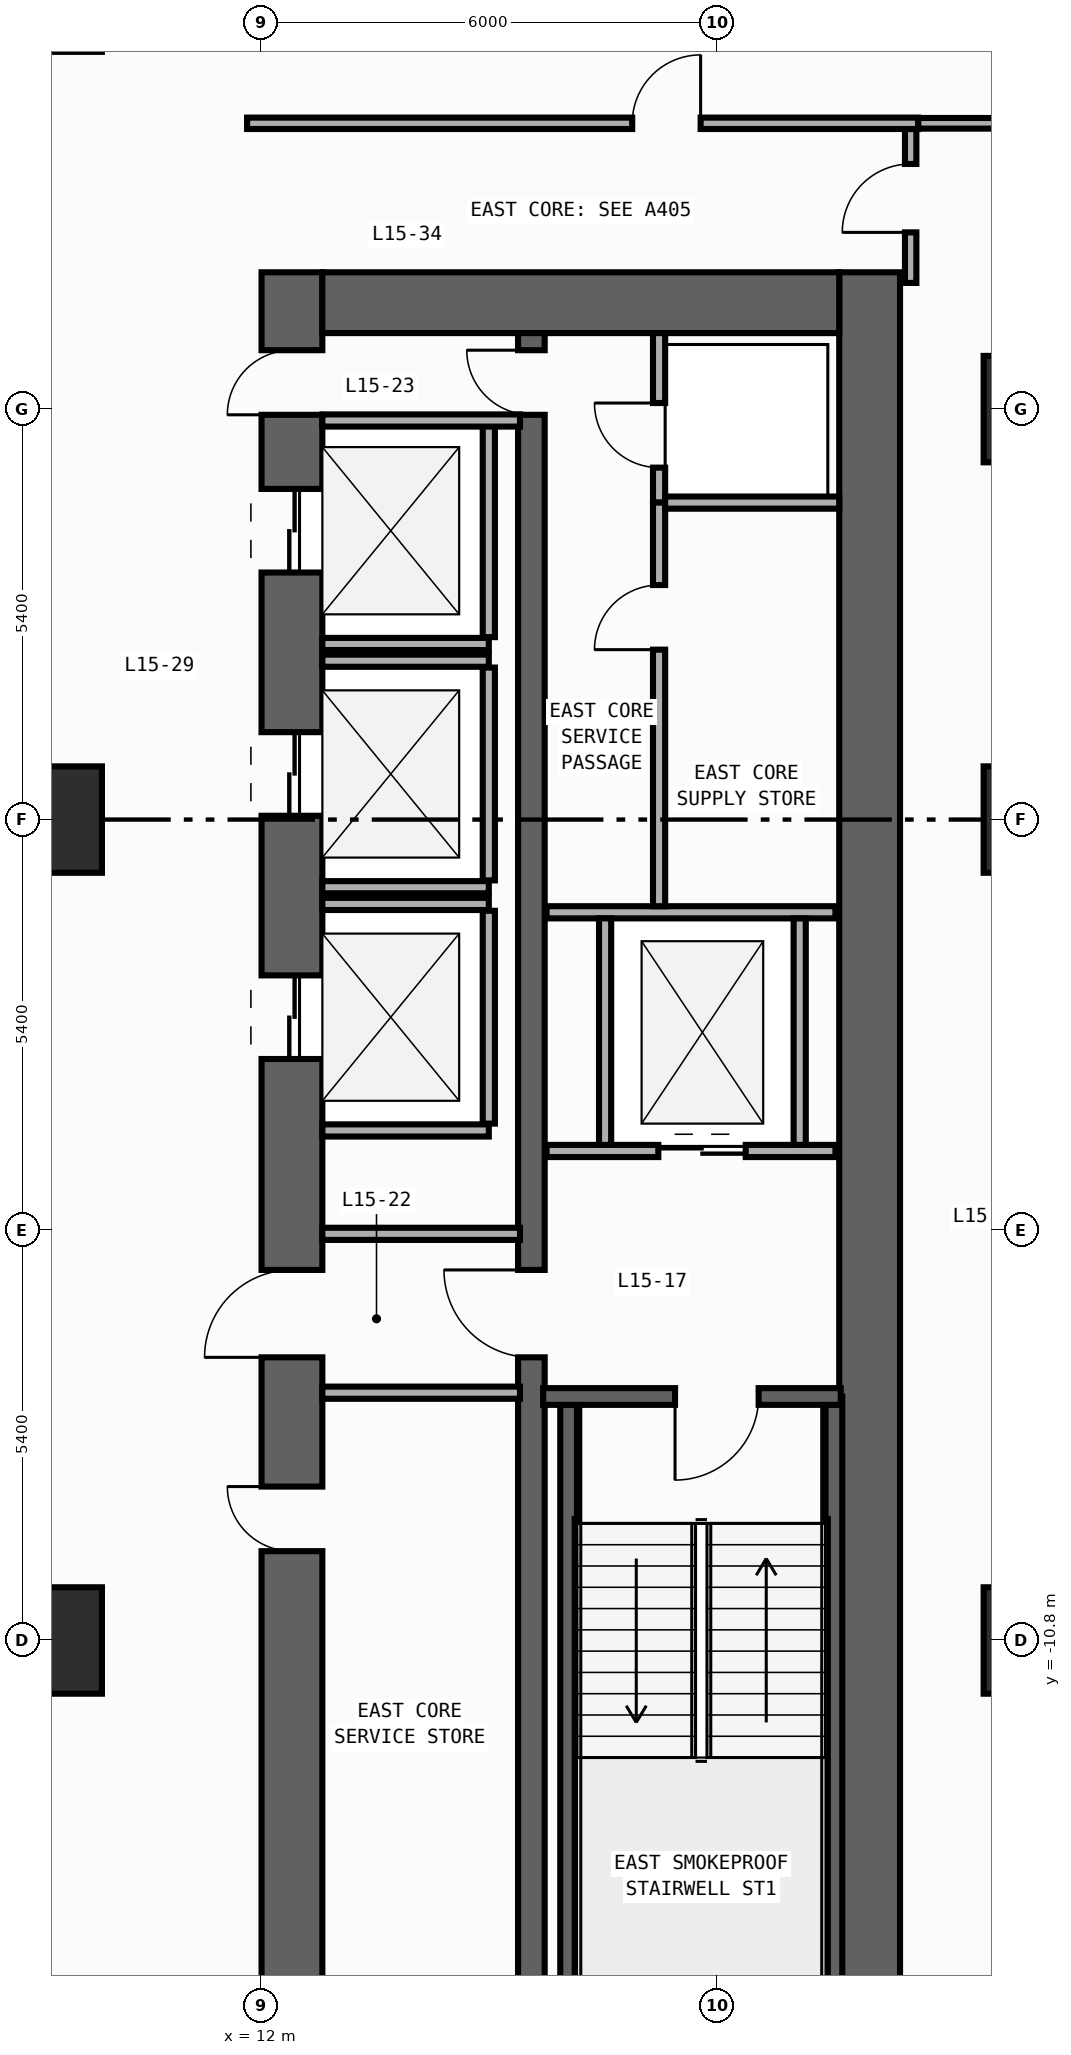
"""IFC4 building model, lengths in metres.
Left out: names, types, materials, properties, quantities, classifications, styles, units other than length and angle.
Written with IfcOpenShell. Run it as: python <this file> out.ifc"""

import sys

from ifc_helpers import new_model, si_unit, direction, frame, frame_2d, origin, origin_2d, place, context, subcontext, project, spatial, rectangle, extrude, element, fill, save


model = new_model("IFC4")
c1 = context("Model", 3, precision=1e-05, world=origin(), true_north=direction((0.0, 1.0)))
c2 = subcontext(c1, "Body", "Model", "MODEL_VIEW")
j1 = project(units=[si_unit("LENGTHUNIT", "METRE"), si_unit("PLANEANGLEUNIT", "RADIAN")], contexts=[c1])
p1 = place(None, origin())
s1 = spatial("IfcSite", under=j1, at=p1, CompositionType="ELEMENT")
p2 = place(p1, origin())
s2 = spatial("IfcBuilding", under=s1, at=p2, CompositionType="ELEMENT")
p3 = place(p2, frame((0.0, 0.0, 63.8)))
s3 = spatial("IfcBuildingStorey", under=s2, at=p3, CompositionType="ELEMENT", Elevation=63.8)
p4 = place(p3, frame((12.4, -19.8, 0.0), z_axis=(0.0, 0.0, 1.0), x_axis=(0.0, 1.0, 0.0)))
e1 = element("IfcWall", 1, at=p4, inside=s3, PredefinedType="SHEAR", context=c2, shape_type="SweptSolid", body=[
    extrude(rectangle(XDim=27.0, YDim=0.8, at=frame_2d((13.5, 0.0))), origin(), (0.0, 0.0, 1.0), 3.94),
])
p5 = place(p4, frame((23.05, 0.0, 0.0)))
e2 = element("IfcOpeningElement", 2, at=p5, cuts=e1, PredefinedType="OPENING", context=c2, shape_type="SweptSolid", body=[
    extrude(rectangle(XDim=1.1, YDim=2.2, at=frame_2d((0.55, 1.1))), frame((0.0, 0.41, 0.0), z_axis=(0.0, -1.0, 0.0), x_axis=(1.0, 0.0, 0.0)), (0.0, 0.0, 1.0), 0.82),
])
p6 = place(p4, frame((19.85, 0.0, 0.0)))
e3 = element("IfcOpeningElement", 3, at=p6, cuts=e1, PredefinedType="OPENING", context=c2, shape_type="SweptSolid", body=[
    extrude(rectangle(XDim=1.1, YDim=2.2, at=frame_2d((0.55, 1.1))), frame((0.0, 0.41, 0.0), z_axis=(0.0, -1.0, 0.0), x_axis=(1.0, 0.0, 0.0)), (0.0, 0.0, 1.0), 0.82),
])
p7 = place(p4, frame((16.65, 0.0, 0.0)))
e4 = element("IfcOpeningElement", 4, at=p7, cuts=e1, PredefinedType="OPENING", context=c2, shape_type="SweptSolid", body=[
    extrude(rectangle(XDim=1.1, YDim=2.2, at=frame_2d((0.55, 1.1))), frame((0.0, 0.41, 0.0), z_axis=(0.0, -1.0, 0.0), x_axis=(1.0, 0.0, 0.0)), (0.0, 0.0, 1.0), 0.82),
])
p8 = place(p4, frame((10.175, 0.0, 0.0)))
e5 = element("IfcOpeningElement", 5, at=p8, cuts=e1, PredefinedType="OPENING", context=c2, shape_type="SweptSolid", body=[
    extrude(rectangle(XDim=0.85, YDim=2.1, at=frame_2d((0.425, 1.05))), frame((0.0, 0.41, 0.0), z_axis=(0.0, -1.0, 0.0), x_axis=(1.0, 0.0, 0.0)), (0.0, 0.0, 1.0), 0.82),
])
p9 = place(p4, frame((12.725, 0.0, 0.0)))
e6 = element("IfcOpeningElement", 6, at=p9, cuts=e1, PredefinedType="OPENING", context=c2, shape_type="SweptSolid", body=[
    extrude(rectangle(XDim=1.15, YDim=2.2, at=frame_2d((0.575, 1.1))), frame((0.0, 0.41, 0.0), z_axis=(0.0, -1.0, 0.0), x_axis=(1.0, 0.0, 0.0)), (0.0, 0.0, 1.0), 0.82),
])
p10 = place(p4, frame((25.125, 0.0, 0.0)))
e7 = element("IfcOpeningElement", 7, at=p10, cuts=e1, PredefinedType="OPENING", context=c2, shape_type="SweptSolid", body=[
    extrude(rectangle(XDim=0.85, YDim=2.1, at=frame_2d((0.425, 1.05))), frame((0.0, 0.41, 0.0), z_axis=(0.0, -1.0, 0.0), x_axis=(1.0, 0.0, 0.0)), (0.0, 0.0, 1.0), 0.82),
])
p11 = place(p3, frame((20.0, -19.8, 0.0), z_axis=(0.0, 0.0, 1.0), x_axis=(0.0, 1.0, 0.0)))
e8 = element("IfcWall", 8, at=p11, inside=s3, PredefinedType="SHEAR", context=c2, shape_type="SweptSolid", body=[
    extrude(rectangle(XDim=27.0, YDim=0.8, at=frame_2d((13.5, 0.0))), origin(), (0.0, 0.0, 1.0), 3.94),
])
p12 = place(p3, frame((12.8, 6.8, 0.0), z_axis=(0.0, 0.0, 1.0), x_axis=(1.0, 0.0, 0.0)))
e9 = element("IfcWall", 9, at=p12, inside=s3, PredefinedType="SHEAR", context=c2, shape_type="SweptSolid", body=[
    extrude(rectangle(XDim=6.8, YDim=0.8, at=frame_2d((3.4, 0.0))), origin(), (0.0, 0.0, 1.0), 3.94),
])
p13 = place(p3, frame((15.55, -19.0, 0.0), z_axis=(0.0, 0.0, 1.0), x_axis=(0.0, 1.0, 0.0)))
e10 = element("IfcWall", 10, at=p13, inside=s3, PredefinedType="SHEAR", context=c2, shape_type="SweptSolid", body=[
    extrude(rectangle(XDim=25.4, YDim=0.35, at=frame_2d((12.7, 0.0))), origin(), (0.0, 0.0, 1.0), 3.94),
])
p14 = place(p13, frame((11.925, 0.0, 0.0)))
e11 = element("IfcOpeningElement", 11, at=p14, cuts=e10, PredefinedType="OPENING", context=c2, shape_type="SweptSolid", body=[
    extrude(rectangle(XDim=1.15, YDim=2.2, at=frame_2d((0.575, 1.1))), frame((0.0, 0.185, 0.0), z_axis=(0.0, -1.0, 0.0), x_axis=(1.0, 0.0, 0.0)), (0.0, 0.0, 1.0), 0.37),
])
p15 = place(p13, frame((24.325, 0.0, 0.0)))
e12 = element("IfcOpeningElement", 12, at=p15, cuts=e10, PredefinedType="OPENING", context=c2, shape_type="SweptSolid", body=[
    extrude(rectangle(XDim=0.85, YDim=2.1, at=frame_2d((0.425, 1.05))), frame((0.0, 0.185, 0.0), z_axis=(0.0, -1.0, 0.0), x_axis=(1.0, 0.0, 0.0)), (0.0, 0.0, 1.0), 0.37),
])
for number, where, z_axis, x_axis in (
    (13, (16.04, -18.89, 0.0), (0.0, 0.0, 1.0), (0.0, 1.0, 0.0)),
    (14, (19.53, -18.89, 0.0), (0.0, 0.0, 1.0), (0.0, 1.0, 0.0)),
):
    element("IfcWall", number, at=place(p3, frame(where, z_axis=z_axis, x_axis=x_axis)), inside=s3, PredefinedType="SHEAR", context=c2, shape_type="SweptSolid", body=[
        extrude(rectangle(XDim=11.3, YDim=0.22, at=frame_2d((5.65, 0.0))), origin(), (0.0, 0.0, 1.0), 3.94),
    ])
p16 = place(p3, frame((19.62, -7.59, 0.0), z_axis=(0.0, 0.0, 1.0), x_axis=(-1.0, 0.0, 0.0)))
e15 = element("IfcWall", 15, at=p16, inside=s3, PredefinedType="SHEAR", context=c2, shape_type="SweptSolid", body=[
    extrude(rectangle(XDim=3.915, YDim=0.22, at=frame_2d((1.958, 0.0))), origin(), (0.0, 0.0, 1.0), 3.94),
])
p17 = place(p16, frame((1.08, 0.0, 0.0)))
e16 = element("IfcOpeningElement", 16, at=p17, cuts=e15, PredefinedType="OPENING", context=c2, shape_type="SweptSolid", body=[
    extrude(rectangle(XDim=1.1, YDim=2.2, at=frame_2d((0.55, 1.1))), frame((0.0, 0.12, 0.0), z_axis=(0.0, -1.0, 0.0), x_axis=(1.0, 0.0, 0.0)), (0.0, 0.0, 1.0), 0.24),
])
for number, where, z_axis, x_axis in (
    (17, (9.2, -10.8, 0.0), (0.0, 0.0, 1.0), (1.0, 0.0, 0.0)),
    (18, (9.2, 0.0, 0.0), (0.0, 0.0, 1.0), (1.0, 0.0, 0.0)),
    (19, (22.2, -10.8, 0.0), (0.0, 0.0, 1.0), (1.0, 0.0, 0.0)),
    (20, (22.2, 0.0, 0.0), (0.0, 0.0, 1.0), (1.0, 0.0, 0.0)),
    (21, (22.2, 5.4, 0.0), (0.0, 0.0, 1.0), (1.0, 0.0, 0.0)),
):
    element("IfcColumn", number, at=place(p3, frame(where, z_axis=z_axis, x_axis=x_axis)), inside=s3, PredefinedType="COLUMN", context=c2, shape_type="SweptSolid", body=[
        extrude(rectangle(XDim=1.4, YDim=1.4, at=origin_2d()), origin(), (0.0, 0.0, 1.0), 4.2),
    ])
p18 = place(p3, frame((12.8, 2.31, 0.0), z_axis=(0.0, 0.0, 1.0), x_axis=(1.0, 0.0, 0.0)))
e22 = element("IfcWall", 22, at=p18, inside=s3, PredefinedType="STANDARD", context=c2, shape_type="SweptSolid", body=[
    extrude(rectangle(XDim=2.19, YDim=0.16, at=frame_2d((1.095, 0.0))), origin(), (0.0, 0.0, 1.0), 3.94),
])
p19 = place(p3, frame((14.99, 2.4, 0.0), z_axis=(0.0, 0.0, 1.0), x_axis=(0.0, 1.0, 0.0)))
e23 = element("IfcWall", 23, at=p19, inside=s3, PredefinedType="STANDARD", context=c2, shape_type="SweptSolid", body=[
    extrude(rectangle(XDim=2.8, YDim=0.16, at=frame_2d((1.4, 0.0))), origin(), (0.0, 0.0, 1.0), 3.94),
])
for number, where, z_axis, x_axis in (
    (24, (12.8, -0.89, 0.0), (0.0, 0.0, 1.0), (1.0, 0.0, 0.0)),
    (25, (12.8, 2.09, 0.0), (0.0, 0.0, 1.0), (1.0, 0.0, 0.0)),
):
    element("IfcWall", number, at=place(p3, frame(where, z_axis=z_axis, x_axis=x_axis)), inside=s3, PredefinedType="STANDARD", context=c2, shape_type="SweptSolid", body=[
        extrude(rectangle(XDim=2.19, YDim=0.16, at=frame_2d((1.095, 0.0))), origin(), (0.0, 0.0, 1.0), 3.94),
    ])
p20 = place(p3, frame((14.99, -0.8, 0.0), z_axis=(0.0, 0.0, 1.0), x_axis=(0.0, 1.0, 0.0)))
e26 = element("IfcWall", 26, at=p20, inside=s3, PredefinedType="STANDARD", context=c2, shape_type="SweptSolid", body=[
    extrude(rectangle(XDim=2.8, YDim=0.16, at=frame_2d((1.4, 0.0))), origin(), (0.0, 0.0, 1.0), 3.94),
])
for number, where, z_axis, x_axis in (
    (27, (12.8, -4.09, 0.0), (0.0, 0.0, 1.0), (1.0, 0.0, 0.0)),
    (28, (12.8, -1.11, 0.0), (0.0, 0.0, 1.0), (1.0, 0.0, 0.0)),
):
    element("IfcWall", number, at=place(p3, frame(where, z_axis=z_axis, x_axis=x_axis)), inside=s3, PredefinedType="STANDARD", context=c2, shape_type="SweptSolid", body=[
        extrude(rectangle(XDim=2.19, YDim=0.16, at=frame_2d((1.095, 0.0))), origin(), (0.0, 0.0, 1.0), 3.94),
    ])
p21 = place(p3, frame((14.99, -4.0, 0.0), z_axis=(0.0, 0.0, 1.0), x_axis=(0.0, 1.0, 0.0)))
e29 = element("IfcWall", 29, at=p21, inside=s3, PredefinedType="STANDARD", context=c2, shape_type="SweptSolid", body=[
    extrude(rectangle(XDim=2.8, YDim=0.16, at=frame_2d((1.4, 0.0))), origin(), (0.0, 0.0, 1.0), 3.94),
])
p22 = place(p3, frame((15.75, -4.36, 0.0), z_axis=(0.0, 0.0, 1.0), x_axis=(1.0, 0.0, 0.0)))
e30 = element("IfcWall", 30, at=p22, inside=s3, PredefinedType="STANDARD", context=c2, shape_type="SweptSolid", body=[
    extrude(rectangle(XDim=3.8, YDim=0.16, at=frame_2d((1.9, 0.0))), origin(), (0.0, 0.0, 1.0), 3.94),
])
p23 = place(p22, frame((1.47, 0.0, 0.0)))
e31 = element("IfcOpeningElement", 31, at=p23, cuts=e30, PredefinedType="OPENING", context=c2, shape_type="SweptSolid", body=[
    extrude(rectangle(XDim=1.15, YDim=2.2, at=frame_2d((0.575, 1.1))), frame((0.0, 0.09, 0.0), z_axis=(0.0, -1.0, 0.0), x_axis=(1.0, 0.0, 0.0)), (0.0, 0.0, 1.0), 0.18),
])
p24 = place(p3, frame((15.75, -1.22, 0.0), z_axis=(0.0, 0.0, 1.0), x_axis=(1.0, 0.0, 0.0)))
e32 = element("IfcWall", 32, at=p24, inside=s3, PredefinedType="STANDARD", context=c2, shape_type="SweptSolid", body=[
    extrude(rectangle(XDim=3.8, YDim=0.16, at=frame_2d((1.9, 0.0))), origin(), (0.0, 0.0, 1.0), 3.94),
])
for number, where, z_axis, x_axis in (
    (33, (16.52, -4.28, 0.0), (0.0, 0.0, 1.0), (0.0, 1.0, 0.0)),
    (34, (19.08, -4.28, 0.0), (0.0, 0.0, 1.0), (0.0, 1.0, 0.0)),
):
    element("IfcWall", number, at=place(p3, frame(where, z_axis=z_axis, x_axis=x_axis)), inside=s3, PredefinedType="STANDARD", context=c2, shape_type="SweptSolid", body=[
        extrude(rectangle(XDim=2.98, YDim=0.16, at=frame_2d((1.49, 0.0))), origin(), (0.0, 0.0, 1.0), 3.94),
    ])
for number, where, z_axis, x_axis in (
    (35, (12.8, -5.45, 0.0), (0.0, 0.0, 1.0), (1.0, 0.0, 0.0)),
    (36, (12.8, -7.54, 0.0), (0.0, 0.0, 1.0), (1.0, 0.0, 0.0)),
    (37, (12.8, 5.25, 0.0), (0.0, 0.0, 1.0), (1.0, 0.0, 0.0)),
):
    element("IfcWall", number, at=place(p3, frame(where, z_axis=z_axis, x_axis=x_axis)), inside=s3, PredefinedType="STANDARD", context=c2, shape_type="SweptSolid", body=[
        extrude(rectangle(XDim=2.6, YDim=0.16, at=frame_2d((1.3, 0.0))), origin(), (0.0, 0.0, 1.0), 3.94),
    ])
p25 = place(p3, frame((17.23, 4.17, 0.0), z_axis=(0.0, 0.0, 1.0), x_axis=(0.0, 1.0, 0.0)))
e38 = element("IfcWall", 38, at=p25, inside=s3, PredefinedType="PARTITIONING", context=c2, shape_type="SweptSolid", body=[
    extrude(rectangle(XDim=2.23, YDim=0.16, at=frame_2d((1.115, 0.0))), origin(), (0.0, 0.0, 1.0), 3.94),
])
p26 = place(p25, frame((0.46, 0.0, 0.0)))
e39 = element("IfcOpeningElement", 39, at=p26, cuts=e38, PredefinedType="OPENING", context=c2, shape_type="SweptSolid", body=[
    extrude(rectangle(XDim=0.85, YDim=2.1, at=frame_2d((0.425, 1.05))), frame((0.0, 0.09, 0.0), z_axis=(0.0, -1.0, 0.0), x_axis=(1.0, 0.0, 0.0)), (0.0, 0.0, 1.0), 0.18),
])
p27 = place(p3, frame((17.23, -1.14, 0.0), z_axis=(0.0, 0.0, 1.0), x_axis=(0.0, 1.0, 0.0)))
e40 = element("IfcWall", 40, at=p27, inside=s3, PredefinedType="PARTITIONING", context=c2, shape_type="SweptSolid", body=[
    extrude(rectangle(XDim=5.31, YDim=0.16, at=frame_2d((2.655, 0.0))), origin(), (0.0, 0.0, 1.0), 3.94),
])
p28 = place(p27, frame((3.375, 0.0, 0.0)))
e41 = element("IfcOpeningElement", 41, at=p28, cuts=e40, PredefinedType="OPENING", context=c2, shape_type="SweptSolid", body=[
    extrude(rectangle(XDim=0.85, YDim=2.1, at=frame_2d((0.425, 1.05))), frame((0.0, 0.09, 0.0), z_axis=(0.0, -1.0, 0.0), x_axis=(1.0, 0.0, 0.0)), (0.0, 0.0, 1.0), 0.18),
])
p29 = place(p3, frame((17.31, 4.17, 0.0), z_axis=(0.0, 0.0, 1.0), x_axis=(1.0, 0.0, 0.0)))
e42 = element("IfcWall", 42, at=p29, inside=s3, PredefinedType="PARTITIONING", context=c2, shape_type="SweptSolid", body=[
    extrude(rectangle(XDim=2.29, YDim=0.16, at=frame_2d((1.145, 0.0))), origin(), (0.0, 0.0, 1.0), 3.94),
])
p30 = place(p3, frame((20.54, 7.06, 0.0), z_axis=(0.0, 0.0, 1.0), x_axis=(0.0, 1.0, 0.0)))
e43 = element("IfcWall", 43, at=p30, inside=s3, PredefinedType="PARTITIONING", context=c2, shape_type="SweptSolid", body=[
    extrude(rectangle(XDim=2.025, YDim=0.15, at=frame_2d((1.012, 0.0))), origin(), (0.0, 0.0, 1.0), 3.94),
])
p31 = place(p30, frame((0.665, 0.0, 0.0)))
e44 = element("IfcOpeningElement", 44, at=p31, cuts=e43, PredefinedType="OPENING", context=c2, shape_type="SweptSolid", body=[
    extrude(rectangle(XDim=0.9, YDim=2.15, at=frame_2d((0.45, 1.075))), frame((0.0, 0.085, 0.0), z_axis=(0.0, -1.0, 0.0), x_axis=(1.0, 0.0, 0.0)), (0.0, 0.0, 1.0), 0.17),
])
p32 = place(p3, frame((11.81, 9.16, 0.0), z_axis=(0.0, 0.0, 1.0), x_axis=(1.0, 0.0, 0.0)))
e45 = element("IfcWall", 45, at=p32, inside=s3, PredefinedType="PARTITIONING", context=c2, shape_type="SweptSolid", body=[
    extrude(rectangle(XDim=8.83, YDim=0.15, at=frame_2d((4.415, 0.0))), origin(), (0.0, 0.0, 1.0), 3.94),
])
p33 = place(p32, frame((5.067, 0.0, 0.0)))
e46 = element("IfcOpeningElement", 46, at=p33, cuts=e45, PredefinedType="OPENING", context=c2, shape_type="SweptSolid", body=[
    extrude(rectangle(XDim=0.9, YDim=2.15, at=frame_2d((0.45, 1.075))), frame((0.0, 0.085, 0.0), z_axis=(0.0, -1.0, 0.0), x_axis=(1.0, 0.0, 0.0)), (0.0, 0.0, 1.0), 0.17),
])
p34 = place(p3, frame((20.64, 9.16, 0.0), z_axis=(0.0, 0.0, 1.0), x_axis=(1.0, 0.0, 0.0)))
e47 = element("IfcWall", 47, at=p34, inside=s3, PredefinedType="PARTITIONING", context=c2, shape_type="SweptSolid", body=[
    extrude(rectangle(XDim=3.415, YDim=0.14, at=frame_2d((1.708, 0.0))), origin(), (0.0, 0.0, 1.0), 3.94),
])
p35 = place(p17, origin())
e48 = element("IfcDoor", 48, at=p35, inside=s3, OperationType="SINGLE_SWING_RIGHT", PredefinedType="DOOR", context=c2, shape_type="SweptSolid", body=[
    extrude(rectangle(XDim=1.1, YDim=2.2, at=frame_2d((0.55, 1.1))), frame((0.0, 0.025, 0.0), z_axis=(0.0, -1.0, 0.0), x_axis=(1.0, 0.0, 0.0)), (0.0, 0.0, 1.0), 0.05),
])
fill(e16, e48)
p36 = place(p5, origin())
e49 = element("IfcDoor", 49, at=p36, inside=s3, OperationType="DOUBLE_DOOR_SLIDING", PredefinedType="DOOR", context=c2, shape_type="SweptSolid", body=[
    extrude(rectangle(XDim=1.1, YDim=2.2, at=frame_2d((0.55, 1.1))), frame((0.0, 0.025, 0.0), z_axis=(0.0, -1.0, 0.0), x_axis=(1.0, 0.0, 0.0)), (0.0, 0.0, 1.0), 0.05),
])
fill(e2, e49)
p37 = place(p6, origin())
e50 = element("IfcDoor", 50, at=p37, inside=s3, OperationType="DOUBLE_DOOR_SLIDING", PredefinedType="DOOR", context=c2, shape_type="SweptSolid", body=[
    extrude(rectangle(XDim=1.1, YDim=2.2, at=frame_2d((0.55, 1.1))), frame((0.0, 0.025, 0.0), z_axis=(0.0, -1.0, 0.0), x_axis=(1.0, 0.0, 0.0)), (0.0, 0.0, 1.0), 0.05),
])
fill(e3, e50)
p38 = place(p7, origin())
e51 = element("IfcDoor", 51, at=p38, inside=s3, OperationType="DOUBLE_DOOR_SLIDING", PredefinedType="DOOR", context=c2, shape_type="SweptSolid", body=[
    extrude(rectangle(XDim=1.1, YDim=2.2, at=frame_2d((0.55, 1.1))), frame((0.0, 0.025, 0.0), z_axis=(0.0, -1.0, 0.0), x_axis=(1.0, 0.0, 0.0)), (0.0, 0.0, 1.0), 0.05),
])
fill(e4, e51)
p39 = place(p8, origin())
e52 = element("IfcDoor", 52, at=p39, inside=s3, OperationType="SINGLE_SWING_RIGHT", PredefinedType="DOOR", context=c2, shape_type="SweptSolid", body=[
    extrude(rectangle(XDim=0.85, YDim=2.1, at=frame_2d((0.425, 1.05))), frame((0.0, 0.025, 0.0), z_axis=(0.0, -1.0, 0.0), x_axis=(1.0, 0.0, 0.0)), (0.0, 0.0, 1.0), 0.05),
])
fill(e5, e52)
p40 = place(p9, origin())
e53 = element("IfcDoor", 53, at=p40, inside=s3, OperationType="SINGLE_SWING_LEFT", PredefinedType="DOOR", context=c2, shape_type="SweptSolid", body=[
    extrude(rectangle(XDim=1.15, YDim=2.2, at=frame_2d((0.575, 1.1))), frame((0.0, 0.025, 0.0), z_axis=(0.0, -1.0, 0.0), x_axis=(1.0, 0.0, 0.0)), (0.0, 0.0, 1.0), 0.05),
])
fill(e6, e53)
p41 = place(p14, origin())
e54 = element("IfcDoor", 54, at=p41, inside=s3, OperationType="SINGLE_SWING_RIGHT", PredefinedType="DOOR", context=c2, shape_type="SweptSolid", body=[
    extrude(rectangle(XDim=1.15, YDim=2.2, at=frame_2d((0.575, 1.1))), frame((0.0, 0.025, 0.0), z_axis=(0.0, -1.0, 0.0), x_axis=(1.0, 0.0, 0.0)), (0.0, 0.0, 1.0), 0.05),
])
fill(e11, e54)
p42 = place(p10, origin())
e55 = element("IfcDoor", 55, at=p42, inside=s3, OperationType="SINGLE_SWING_LEFT", PredefinedType="DOOR", context=c2, shape_type="SweptSolid", body=[
    extrude(rectangle(XDim=0.85, YDim=2.1, at=frame_2d((0.425, 1.05))), frame((0.0, 0.025, 0.0), z_axis=(0.0, -1.0, 0.0), x_axis=(1.0, 0.0, 0.0)), (0.0, 0.0, 1.0), 0.05),
])
fill(e7, e55)
p43 = place(p15, origin())
e56 = element("IfcDoor", 56, at=p43, inside=s3, OperationType="SINGLE_SWING_RIGHT", PredefinedType="DOOR", context=c2, shape_type="SweptSolid", body=[
    extrude(rectangle(XDim=0.85, YDim=2.1, at=frame_2d((0.425, 1.05))), frame((0.0, 0.025, 0.0), z_axis=(0.0, -1.0, 0.0), x_axis=(1.0, 0.0, 0.0)), (0.0, 0.0, 1.0), 0.05),
])
fill(e12, e56)
p44 = place(p23, origin())
e57 = element("IfcDoor", 57, at=p44, inside=s3, OperationType="DOUBLE_DOOR_SLIDING", PredefinedType="DOOR", context=c2, shape_type="SweptSolid", body=[
    extrude(rectangle(XDim=1.15, YDim=2.2, at=frame_2d((0.575, 1.1))), frame((0.0, 0.025, 0.0), z_axis=(0.0, -1.0, 0.0), x_axis=(1.0, 0.0, 0.0)), (0.0, 0.0, 1.0), 0.05),
])
fill(e31, e57)
p45 = place(p26, origin())
e58 = element("IfcDoor", 58, at=p45, inside=s3, OperationType="SINGLE_SWING_RIGHT", PredefinedType="DOOR", context=c2, shape_type="SweptSolid", body=[
    extrude(rectangle(XDim=0.85, YDim=2.1, at=frame_2d((0.425, 1.05))), frame((0.0, 0.025, 0.0), z_axis=(0.0, -1.0, 0.0), x_axis=(1.0, 0.0, 0.0)), (0.0, 0.0, 1.0), 0.05),
])
fill(e39, e58)
p46 = place(p28, origin())
e59 = element("IfcDoor", 59, at=p46, inside=s3, OperationType="SINGLE_SWING_LEFT", PredefinedType="DOOR", context=c2, shape_type="SweptSolid", body=[
    extrude(rectangle(XDim=0.85, YDim=2.1, at=frame_2d((0.425, 1.05))), frame((0.0, 0.025, 0.0), z_axis=(0.0, -1.0, 0.0), x_axis=(1.0, 0.0, 0.0)), (0.0, 0.0, 1.0), 0.05),
])
fill(e41, e59)
p47 = place(p31, origin())
e60 = element("IfcDoor", 60, at=p47, inside=s3, OperationType="SINGLE_SWING_LEFT", PredefinedType="DOOR", context=c2, shape_type="SweptSolid", body=[
    extrude(rectangle(XDim=0.9, YDim=2.15, at=frame_2d((0.45, 1.075))), frame((0.0, 0.025, 0.0), z_axis=(0.0, -1.0, 0.0), x_axis=(1.0, 0.0, 0.0)), (0.0, 0.0, 1.0), 0.05),
])
fill(e44, e60)
p48 = place(p33, origin())
e61 = element("IfcDoor", 61, at=p48, inside=s3, OperationType="SINGLE_SWING_RIGHT", PredefinedType="DOOR", context=c2, shape_type="SweptSolid", body=[
    extrude(rectangle(XDim=0.9, YDim=2.15, at=frame_2d((0.45, 1.075))), frame((0.0, 0.025, 0.0), z_axis=(0.0, -1.0, 0.0), x_axis=(1.0, 0.0, 0.0)), (0.0, 0.0, 1.0), 0.05),
])
fill(e46, e61)
save(model, sys.argv[1])
